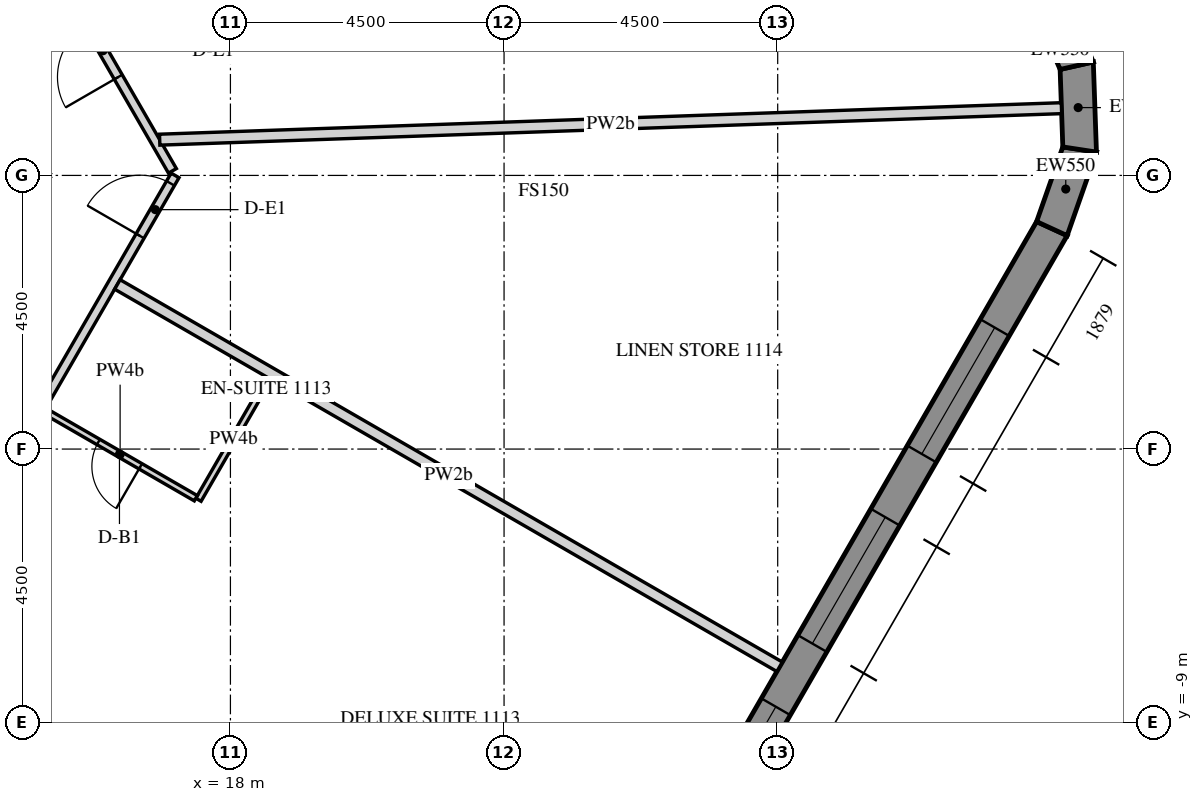
"""IFC4 building model, lengths in metres.
Left out: names, types, materials, properties, quantities, classifications, styles, units other than length and angle.
Written with IfcOpenShell. Run it as: python <this file> out.ifc"""

import sys

from ifc_helpers import new_model, si_unit, direction, frame, frame_2d, origin, place, context, subcontext, project, spatial, polyline, rectangle, outline, extrude, element, fill, save


model = new_model("IFC4")
c1 = context("Model", 3, precision=1e-05, world=origin(), true_north=direction((0.0, 1.0)))
c2 = subcontext(c1, "Body", "Model", "MODEL_VIEW")
j1 = project(units=[si_unit("LENGTHUNIT", "METRE"), si_unit("PLANEANGLEUNIT", "RADIAN")], contexts=[c1])
p1 = place(None, origin())
s1 = spatial("IfcSite", under=j1, at=p1, CompositionType="ELEMENT")
p2 = place(p1, origin())
s2 = spatial("IfcBuilding", under=s1, at=p2, CompositionType="ELEMENT")
p3 = place(p2, frame((0.0, 0.0, 156.6)))
s3 = spatial("IfcBuildingStorey", under=s2, at=p3, CompositionType="ELEMENT", Elevation=156.6)
p4 = place(p3, frame((17.63, -24.914, -0.15), z_axis=(0.0, 0.0, 1.0), x_axis=(0.499998569178, 0.866026229868, 0.0)))
e1 = element("IfcWall", 1, at=p4, inside=s3, PredefinedType="SOLIDWALL", context=c2, shape_type="SweptSolid", body=[
    extrude(outline(polyline([(-0.022, -0.275), (27.783, -0.275), (27.732, 0.275), (0.022, 0.275), (-0.022, -0.275)])), origin(), (0.0, 0.0, 1.0), 3.9),
])
p5 = place(p4, frame((1.879, 0.0, 1.05)))
e2 = element("IfcOpeningElement", 2, at=p5, cuts=e1, PredefinedType="OPENING", context=c2, shape_type="SweptSolid", body=[
    extrude(rectangle(XDim=2.4, YDim=2.4, at=frame_2d((1.2, 1.2))), frame((0.0, 0.285, 0.0), z_axis=(0.0, -1.0, 0.0), x_axis=(1.0, 0.0, 0.0)), (0.0, 0.0, 1.0), 0.57),
])
p6 = place(p4, frame((5.479, 0.0, 1.05)))
e3 = element("IfcOpeningElement", 3, at=p6, cuts=e1, PredefinedType="OPENING", context=c2, shape_type="SweptSolid", body=[
    extrude(rectangle(XDim=2.4, YDim=2.4, at=frame_2d((1.2, 1.2))), frame((0.0, 0.285, 0.0), z_axis=(0.0, -1.0, 0.0), x_axis=(1.0, 0.0, 0.0)), (0.0, 0.0, 1.0), 0.57),
])
p7 = place(p4, frame((9.079, 0.0, 1.05)))
e4 = element("IfcOpeningElement", 4, at=p7, cuts=e1, PredefinedType="OPENING", context=c2, shape_type="SweptSolid", body=[
    extrude(rectangle(XDim=2.4, YDim=2.4, at=frame_2d((1.2, 1.2))), frame((0.0, 0.285, 0.0), z_axis=(0.0, -1.0, 0.0), x_axis=(1.0, 0.0, 0.0)), (0.0, 0.0, 1.0), 0.57),
])
p8 = place(p4, frame((12.679, 0.0, 1.05)))
e5 = element("IfcOpeningElement", 5, at=p8, cuts=e1, PredefinedType="OPENING", context=c2, shape_type="SweptSolid", body=[
    extrude(rectangle(XDim=2.4, YDim=2.4, at=frame_2d((1.2, 1.2))), frame((0.0, 0.285, 0.0), z_axis=(0.0, -1.0, 0.0), x_axis=(1.0, 0.0, 0.0)), (0.0, 0.0, 1.0), 0.57),
])
p9 = place(p4, frame((16.279, 0.0, 1.05)))
e6 = element("IfcOpeningElement", 6, at=p9, cuts=e1, PredefinedType="OPENING", context=c2, shape_type="SweptSolid", body=[
    extrude(rectangle(XDim=2.4, YDim=2.4, at=frame_2d((1.2, 1.2))), frame((0.0, 0.285, 0.0), z_axis=(0.0, -1.0, 0.0), x_axis=(1.0, 0.0, 0.0)), (0.0, 0.0, 1.0), 0.57),
])
p10 = place(p4, frame((19.879, 0.0, 1.05)))
e7 = element("IfcOpeningElement", 7, at=p10, cuts=e1, PredefinedType="OPENING", context=c2, shape_type="SweptSolid", body=[
    extrude(rectangle(XDim=2.4, YDim=2.4, at=frame_2d((1.2, 1.2))), frame((0.0, 0.285, 0.0), z_axis=(0.0, -1.0, 0.0), x_axis=(1.0, 0.0, 0.0)), (0.0, 0.0, 1.0), 0.57),
])
p11 = place(p4, frame((23.479, 0.0, 1.05)))
e8 = element("IfcOpeningElement", 8, at=p11, cuts=e1, PredefinedType="OPENING", context=c2, shape_type="SweptSolid", body=[
    extrude(rectangle(XDim=2.4, YDim=2.4, at=frame_2d((1.2, 1.2))), frame((0.0, 0.285, 0.0), z_axis=(0.0, -1.0, 0.0), x_axis=(1.0, 0.0, 0.0)), (0.0, 0.0, 1.0), 0.57),
])
p12 = place(p3, frame((31.509, -0.875, -0.15), z_axis=(0.0, 0.0, 1.0), x_axis=(0.33111537203, 0.943590276765, 0.0)))
e9 = element("IfcWall", 9, at=p12, inside=s3, PredefinedType="SOLIDWALL", context=c2, shape_type="SweptSolid", body=[
    extrude(outline(polyline([(-0.026, -0.275), (1.431, -0.275), (1.327, 0.275), (0.026, 0.275), (-0.026, -0.275)])), origin(), (0.0, 0.0, 1.0), 3.9),
])
p13 = place(p3, frame((31.966, 0.426, -0.15), z_axis=(0.0, 0.0, 1.0), x_axis=(-0.034876908462, 0.999391615562, 0.0)))
e10 = element("IfcWall", 10, at=p13, inside=s3, PredefinedType="SOLIDWALL", context=c2, shape_type="SweptSolid", body=[
    extrude(outline(polyline([(-0.052, -0.275), (1.431, -0.275), (1.327, 0.275), (0.052, 0.275), (-0.052, -0.275)])), origin(), (0.0, 0.0, 1.0), 3.9),
])
p14 = place(p3, frame((31.917, 1.804, -0.15), z_axis=(0.0, 0.0, 1.0), x_axis=(-0.396225741392, 0.918153125496, 0.0)))
e11 = element("IfcWall", 11, at=p14, inside=s3, PredefinedType="SOLIDWALL", context=c2, shape_type="SweptSolid", body=[
    extrude(outline(polyline([(-0.052, -0.275), (1.405, -0.275), (1.353, 0.275), (0.052, 0.275), (-0.052, -0.275)])), origin(), (0.0, 0.0, 1.0), 3.9),
])
p15 = place(p3, frame((10.714, -11.043, 0.0), z_axis=(0.0, 0.0, 1.0), x_axis=(0.500001980452, 0.866024260367, 0.0)))
e12 = element("IfcWall", 12, at=p15, inside=s3, PredefinedType="PARTITIONING", context=c2, shape_type="SweptSolid", body=[
    extrude(rectangle(XDim=12.752, YDim=0.15, at=frame_2d((6.376, 0.0))), origin(), (0.0, 0.0, 1.0), 2.823),
])
p16 = place(p15, frame((3.625, 0.0, 0.0)))
e13 = element("IfcOpeningElement", 13, at=p16, cuts=e12, PredefinedType="OPENING", context=c2, shape_type="SweptSolid", body=[
    extrude(rectangle(XDim=1.0, YDim=2.1, at=frame_2d((0.5, 1.05))), frame((0.0, 0.085, 0.0), z_axis=(0.0, -1.0, 0.0), x_axis=(1.0, 0.0, 0.0)), (0.0, 0.0, 1.0), 0.17),
])
p17 = place(p15, frame((11.602, 0.0, 0.0)))
e14 = element("IfcOpeningElement", 14, at=p17, cuts=e12, PredefinedType="OPENING", context=c2, shape_type="SweptSolid", body=[
    extrude(rectangle(XDim=1.0, YDim=2.1, at=frame_2d((0.5, 1.05))), frame((0.0, 0.085, 0.0), z_axis=(0.0, -1.0, 0.0), x_axis=(1.0, 0.0, 0.0)), (0.0, 0.0, 1.0), 0.17),
])
p18 = place(p3, frame((17.046, 0.075, 0.0), z_axis=(0.0, 0.0, 1.0), x_axis=(-0.499999403554, 0.866025748143, 0.0)))
e15 = element("IfcWall", 15, at=p18, inside=s3, PredefinedType="PARTITIONING", context=c2, shape_type="SweptSolid", body=[
    extrude(rectangle(XDim=14.549, YDim=0.15, at=frame_2d((7.275, 0.0))), origin(), (0.0, 0.0, 1.0), 2.823),
])
p19 = place(p18, frame((1.781, 0.0, 0.0)))
e16 = element("IfcOpeningElement", 16, at=p19, cuts=e15, PredefinedType="OPENING", context=c2, shape_type="SweptSolid", body=[
    extrude(rectangle(XDim=1.0, YDim=2.1, at=frame_2d((0.5, 1.05))), frame((0.0, 0.085, 0.0), z_axis=(0.0, -1.0, 0.0), x_axis=(1.0, 0.0, 0.0)), (0.0, 0.0, 1.0), 0.17),
])
p20 = place(p18, frame((8.705, 0.0, 0.0)))
e17 = element("IfcOpeningElement", 17, at=p20, cuts=e15, PredefinedType="OPENING", context=c2, shape_type="SweptSolid", body=[
    extrude(rectangle(XDim=1.0, YDim=2.1, at=frame_2d((0.5, 1.05))), frame((0.0, 0.085, 0.0), z_axis=(0.0, -1.0, 0.0), x_axis=(1.0, 0.0, 0.0)), (0.0, 0.0, 1.0), 0.17),
])
p21 = place(p3, frame((18.629, -3.333, 0.0), z_axis=(0.0, 0.0, 1.0), x_axis=(-0.500015210774, -0.866016621662, 0.0)))
e18 = element("IfcWall", 18, at=p21, inside=s3, PredefinedType="PARTITIONING", context=c2, shape_type="SweptSolid", body=[
    extrude(rectangle(XDim=2.31, YDim=0.1, at=frame_2d((1.155, 0.0))), origin(), (0.0, 0.0, 1.0), 2.823),
])
p22 = place(p3, frame((17.431, -5.309, 0.0), z_axis=(0.0, 0.0, 1.0), x_axis=(-0.866018712932, 0.500011588718, 0.0)))
e19 = element("IfcWall", 19, at=p22, inside=s3, PredefinedType="PARTITIONING", context=c2, shape_type="SweptSolid", body=[
    extrude(rectangle(XDim=2.875, YDim=0.1, at=frame_2d((1.438, 0.0))), origin(), (0.0, 0.0, 1.0), 2.823),
])
p23 = place(p22, frame((1.05, 0.0, 0.0)))
e20 = element("IfcOpeningElement", 20, at=p23, cuts=e19, PredefinedType="OPENING", context=c2, shape_type="SweptSolid", body=[
    extrude(rectangle(XDim=0.8, YDim=2.1, at=frame_2d((0.4, 1.05))), frame((0.0, 0.06, 0.0), z_axis=(0.0, -1.0, 0.0), x_axis=(1.0, 0.0, 0.0)), (0.0, 0.0, 1.0), 0.12),
])
p24 = place(p3, frame((27.031, -8.08, 0.0), z_axis=(0.0, 0.0, 1.0), x_axis=(-0.86602780907, 0.499995833901, 0.0)))
e21 = element("IfcWall", 21, at=p24, inside=s3, PredefinedType="PARTITIONING", context=c2, shape_type="SweptSolid", body=[
    extrude(rectangle(XDim=12.575, YDim=0.18, at=frame_2d((6.287, 0.0))), origin(), (0.0, 0.0, 1.0), 2.823),
])
p25 = place(p3, frame((31.667, 1.106, 0.0), z_axis=(0.0, 0.0, 1.0), x_axis=(-0.999390937365, -0.034896336667, 0.0)))
e22 = element("IfcWall", 22, at=p25, inside=s3, PredefinedType="PARTITIONING", context=c2, shape_type="SweptSolid", body=[
    extrude(rectangle(XDim=14.839, YDim=0.18, at=frame_2d((7.419, 0.0))), origin(), (0.0, 0.0, 1.0), 2.823),
])
p26 = place(p9, frame((0.0, 0.205, 0.0)))
e23 = element("IfcWindow", 23, at=p26, inside=s3, PartitioningType="DOUBLE_PANEL_VERTICAL", PredefinedType="WINDOW", context=c2, shape_type="SweptSolid", body=[
    extrude(rectangle(XDim=2.4, YDim=2.4, at=frame_2d((1.2, 1.2))), frame((0.0, 0.03, 0.0), z_axis=(0.0, -1.0, 0.0), x_axis=(1.0, 0.0, 0.0)), (0.0, 0.0, 1.0), 0.06),
])
fill(e6, e23)
p27 = place(p10, frame((0.0, 0.205, 0.0)))
e24 = element("IfcWindow", 24, at=p27, inside=s3, PartitioningType="DOUBLE_PANEL_VERTICAL", PredefinedType="WINDOW", context=c2, shape_type="SweptSolid", body=[
    extrude(rectangle(XDim=2.4, YDim=2.4, at=frame_2d((1.2, 1.2))), frame((0.0, 0.03, 0.0), z_axis=(0.0, -1.0, 0.0), x_axis=(1.0, 0.0, 0.0)), (0.0, 0.0, 1.0), 0.06),
])
fill(e7, e24)
p28 = place(p11, frame((0.0, 0.205, 0.0)))
e25 = element("IfcWindow", 25, at=p28, inside=s3, PartitioningType="DOUBLE_PANEL_VERTICAL", PredefinedType="WINDOW", context=c2, shape_type="SweptSolid", body=[
    extrude(rectangle(XDim=2.4, YDim=2.4, at=frame_2d((1.2, 1.2))), frame((0.0, 0.03, 0.0), z_axis=(0.0, -1.0, 0.0), x_axis=(1.0, 0.0, 0.0)), (0.0, 0.0, 1.0), 0.06),
])
fill(e8, e25)
p29 = place(p23, origin())
e26 = element("IfcDoor", 26, at=p29, inside=s3, OperationType="SINGLE_SWING_LEFT", PredefinedType="DOOR", context=c2, shape_type="SweptSolid", body=[
    extrude(rectangle(XDim=0.8, YDim=2.1, at=frame_2d((0.4, 1.05))), frame((0.0, 0.025, 0.0), z_axis=(0.0, -1.0, 0.0), x_axis=(1.0, 0.0, 0.0)), (0.0, 0.0, 1.0), 0.05),
])
fill(e20, e26)
p30 = place(p17, origin())
e27 = element("IfcDoor", 27, at=p30, inside=s3, OperationType="SINGLE_SWING_LEFT", PredefinedType="DOOR", context=c2, shape_type="SweptSolid", body=[
    extrude(rectangle(XDim=1.0, YDim=2.1, at=frame_2d((0.5, 1.05))), frame((0.0, 0.025, 0.0), z_axis=(0.0, -1.0, 0.0), x_axis=(1.0, 0.0, 0.0)), (0.0, 0.0, 1.0), 0.05),
])
fill(e14, e27)
p31 = place(p19, origin())
e28 = element("IfcDoor", 28, at=p31, inside=s3, OperationType="SINGLE_SWING_LEFT", PredefinedType="DOOR", context=c2, shape_type="SweptSolid", body=[
    extrude(rectangle(XDim=1.0, YDim=2.1, at=frame_2d((0.5, 1.05))), frame((0.0, 0.025, 0.0), z_axis=(0.0, -1.0, 0.0), x_axis=(1.0, 0.0, 0.0)), (0.0, 0.0, 1.0), 0.05),
])
fill(e16, e28)
save(model, sys.argv[1])
